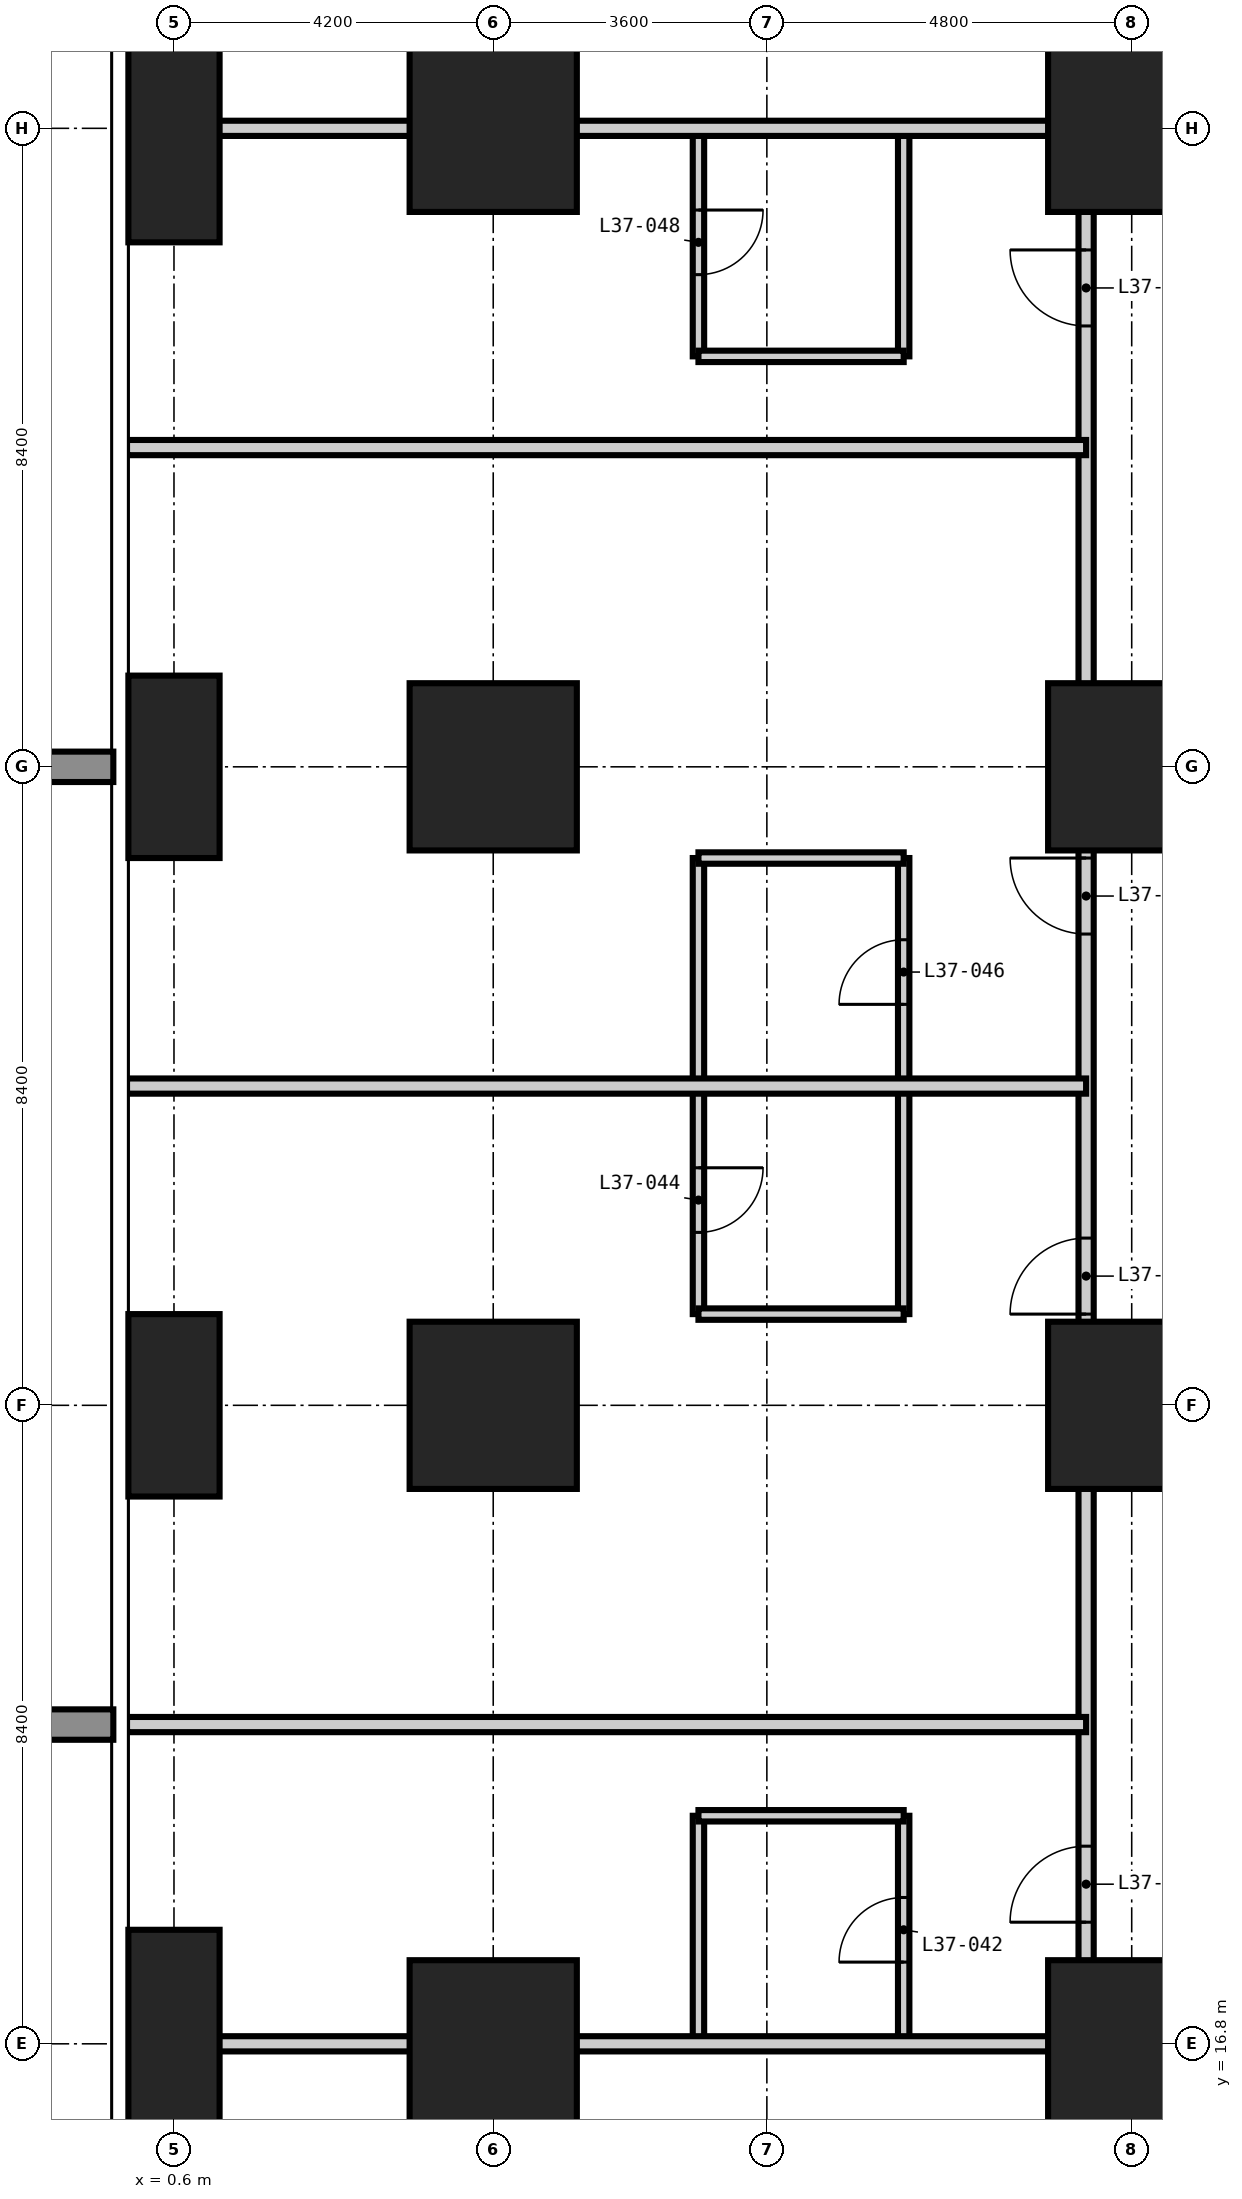
"""IFC4 building model, lengths in metres.
Left out: names, types, materials, properties, quantities, classifications, styles, units other than length and angle.
Written with IfcOpenShell. Run it as: python <this file> out.ifc"""

import sys

from ifc_helpers import new_model, si_unit, direction, frame, frame_2d, origin, origin_2d, place, context, subcontext, project, spatial, rectangle, extrude, element, fill, save


model = new_model("IFC4")
c1 = context("Model", 3, precision=1e-05, world=origin(), true_north=direction((0.0, 1.0)))
c2 = subcontext(c1, "Body", "Model", "MODEL_VIEW")
j1 = project(units=[si_unit("LENGTHUNIT", "METRE"), si_unit("PLANEANGLEUNIT", "RADIAN")], contexts=[c1])
p1 = place(None, origin())
s1 = spatial("IfcSite", under=j1, at=p1, CompositionType="ELEMENT")
p2 = place(p1, origin())
s2 = spatial("IfcBuilding", under=s1, at=p2, CompositionType="ELEMENT")
p3 = place(p2, frame((0.0, 0.0, 144.0)))
s3 = spatial("IfcBuildingStorey", under=s2, at=p3, CompositionType="ELEMENT", Elevation=144.0)
p4 = place(p3, frame((0.6, 16.8, -0.35), z_axis=(0.0, 0.0, 1.0), x_axis=(1.0, 0.0, 0.0)))
e1 = element("IfcColumn", 1, at=p4, inside=s3, PredefinedType="COLUMN", context=c2, shape_type="SweptSolid", body=[
    extrude(rectangle(XDim=1.2, YDim=3.0, at=origin_2d()), origin(), (0.0, 0.0, 1.0), 3.6),
])
for number, where, z_axis, x_axis in (
    (2, (0.6, 25.2, -0.35), (0.0, 0.0, 1.0), (1.0, 0.0, 0.0)),
    (3, (0.6, 33.6, -0.35), (0.0, 0.0, 1.0), (1.0, 0.0, 0.0)),
):
    element("IfcColumn", number, at=place(p3, frame(where, z_axis=z_axis, x_axis=x_axis)), inside=s3, PredefinedType="COLUMN", context=c2, shape_type="SweptSolid", body=[
        extrude(rectangle(XDim=1.2, YDim=2.4, at=origin_2d()), origin(), (0.0, 0.0, 1.0), 3.6),
    ])
p5 = place(p3, frame((0.6, 42.0, -0.35), z_axis=(0.0, 0.0, 1.0), x_axis=(1.0, 0.0, 0.0)))
e4 = element("IfcColumn", 4, at=p5, inside=s3, PredefinedType="COLUMN", context=c2, shape_type="SweptSolid", body=[
    extrude(rectangle(XDim=1.2, YDim=3.0, at=origin_2d()), origin(), (0.0, 0.0, 1.0), 3.6),
])
for number, where, z_axis, x_axis in (
    (5, (4.8, 16.8, -0.35), (0.0, 0.0, 1.0), (1.0, 0.0, 0.0)),
    (6, (4.8, 25.2, -0.35), (0.0, 0.0, 1.0), (1.0, 0.0, 0.0)),
    (7, (4.8, 33.6, -0.35), (0.0, 0.0, 1.0), (1.0, 0.0, 0.0)),
    (8, (4.8, 42.0, -0.35), (0.0, 0.0, 1.0), (1.0, 0.0, 0.0)),
    (9, (13.2, 16.8, -0.35), (0.0, 0.0, 1.0), (1.0, 0.0, 0.0)),
    (10, (13.2, 25.2, -0.35), (0.0, 0.0, 1.0), (1.0, 0.0, 0.0)),
    (11, (13.2, 33.6, -0.35), (0.0, 0.0, 1.0), (1.0, 0.0, 0.0)),
    (12, (13.2, 42.0, -0.35), (0.0, 0.0, 1.0), (1.0, 0.0, 0.0)),
):
    element("IfcColumn", number, at=place(p3, frame(where, z_axis=z_axis, x_axis=x_axis)), inside=s3, PredefinedType="COLUMN", context=c2, shape_type="SweptSolid", body=[
        extrude(rectangle(XDim=2.2, YDim=2.2, at=origin_2d()), origin(), (0.0, 0.0, 1.0), 3.6),
    ])
p6 = place(p3, frame((7.5, 16.8, 0.0), z_axis=(0.0, 0.0, 1.0), x_axis=(0.0, 1.0, 0.0)))
e13 = element("IfcWall", 13, at=p6, inside=s3, PredefinedType="PARTITIONING", context=c2, shape_type="SweptSolid", body=[
    extrude(rectangle(XDim=3.0, YDim=0.15, at=frame_2d((1.5, 0.0))), origin(), (0.0, 0.0, 1.0), 3.25),
])
p7 = place(p3, frame((7.5, 26.4, 0.0), z_axis=(0.0, 0.0, 1.0), x_axis=(0.0, 1.0, 0.0)))
e14 = element("IfcWall", 14, at=p7, inside=s3, PredefinedType="PARTITIONING", context=c2, shape_type="SweptSolid", body=[
    extrude(rectangle(XDim=6.0, YDim=0.15, at=frame_2d((3.0, 0.0))), origin(), (0.0, 0.0, 1.0), 3.25),
])
p8 = place(p7, frame((1.075, 0.0, 0.0)))
e15 = element("IfcOpeningElement", 15, at=p8, cuts=e14, PredefinedType="OPENING", context=c2, shape_type="SweptSolid", body=[
    extrude(rectangle(XDim=0.85, YDim=2.1, at=frame_2d((0.425, 1.05))), frame((0.0, 0.085, 0.0), z_axis=(0.0, -1.0, 0.0), x_axis=(1.0, 0.0, 0.0)), (0.0, 0.0, 1.0), 0.17),
])
p9 = place(p3, frame((7.5, 39.0, 0.0), z_axis=(0.0, 0.0, 1.0), x_axis=(0.0, 1.0, 0.0)))
e16 = element("IfcWall", 16, at=p9, inside=s3, PredefinedType="PARTITIONING", context=c2, shape_type="SweptSolid", body=[
    extrude(rectangle(XDim=3.0, YDim=0.15, at=frame_2d((1.5, 0.0))), origin(), (0.0, 0.0, 1.0), 3.25),
])
p10 = place(p9, frame((1.075, 0.0, 0.0)))
e17 = element("IfcOpeningElement", 17, at=p10, cuts=e16, PredefinedType="OPENING", context=c2, shape_type="SweptSolid", body=[
    extrude(rectangle(XDim=0.85, YDim=2.1, at=frame_2d((0.425, 1.05))), frame((0.0, 0.085, 0.0), z_axis=(0.0, -1.0, 0.0), x_axis=(1.0, 0.0, 0.0)), (0.0, 0.0, 1.0), 0.17),
])
p11 = place(p3, frame((10.2, 16.8, 0.0), z_axis=(0.0, 0.0, 1.0), x_axis=(0.0, 1.0, 0.0)))
e18 = element("IfcWall", 18, at=p11, inside=s3, PredefinedType="PARTITIONING", context=c2, shape_type="SweptSolid", body=[
    extrude(rectangle(XDim=3.0, YDim=0.15, at=frame_2d((1.5, 0.0))), origin(), (0.0, 0.0, 1.0), 3.25),
])
p12 = place(p11, frame((1.075, 0.0, 0.0)))
e19 = element("IfcOpeningElement", 19, at=p12, cuts=e18, PredefinedType="OPENING", context=c2, shape_type="SweptSolid", body=[
    extrude(rectangle(XDim=0.85, YDim=2.1, at=frame_2d((0.425, 1.05))), frame((0.0, 0.085, 0.0), z_axis=(0.0, -1.0, 0.0), x_axis=(1.0, 0.0, 0.0)), (0.0, 0.0, 1.0), 0.17),
])
p13 = place(p3, frame((10.2, 26.4, 0.0), z_axis=(0.0, 0.0, 1.0), x_axis=(0.0, 1.0, 0.0)))
e20 = element("IfcWall", 20, at=p13, inside=s3, PredefinedType="PARTITIONING", context=c2, shape_type="SweptSolid", body=[
    extrude(rectangle(XDim=6.0, YDim=0.15, at=frame_2d((3.0, 0.0))), origin(), (0.0, 0.0, 1.0), 3.25),
])
p14 = place(p13, frame((4.075, 0.0, 0.0)))
e21 = element("IfcOpeningElement", 21, at=p14, cuts=e20, PredefinedType="OPENING", context=c2, shape_type="SweptSolid", body=[
    extrude(rectangle(XDim=0.85, YDim=2.1, at=frame_2d((0.425, 1.05))), frame((0.0, 0.085, 0.0), z_axis=(0.0, -1.0, 0.0), x_axis=(1.0, 0.0, 0.0)), (0.0, 0.0, 1.0), 0.17),
])
p15 = place(p3, frame((10.2, 39.0, 0.0), z_axis=(0.0, 0.0, 1.0), x_axis=(0.0, 1.0, 0.0)))
e22 = element("IfcWall", 22, at=p15, inside=s3, PredefinedType="PARTITIONING", context=c2, shape_type="SweptSolid", body=[
    extrude(rectangle(XDim=3.0, YDim=0.15, at=frame_2d((1.5, 0.0))), origin(), (0.0, 0.0, 1.0), 3.25),
])
for number, where, z_axis, x_axis in (
    (23, (7.5, 19.8, 0.0), (0.0, 0.0, 1.0), (1.0, 0.0, 0.0)),
    (24, (7.5, 26.4, 0.0), (0.0, 0.0, 1.0), (1.0, 0.0, 0.0)),
    (25, (7.5, 32.4, 0.0), (0.0, 0.0, 1.0), (1.0, 0.0, 0.0)),
    (26, (7.5, 39.0, 0.0), (0.0, 0.0, 1.0), (1.0, 0.0, 0.0)),
):
    element("IfcWall", number, at=place(p3, frame(where, z_axis=z_axis, x_axis=x_axis)), inside=s3, PredefinedType="PARTITIONING", context=c2, shape_type="SweptSolid", body=[
        extrude(rectangle(XDim=2.7, YDim=0.15, at=frame_2d((1.35, 0.0))), origin(), (0.0, 0.0, 1.0), 3.25),
    ])
p16 = place(p3, frame((12.6, 13.1, 0.0), z_axis=(0.0, 0.0, 1.0), x_axis=(0.0, 1.0, 0.0)))
e27 = element("IfcWall", 27, at=p16, inside=s3, PredefinedType="PARTITIONING", context=c2, shape_type="SweptSolid", body=[
    extrude(rectangle(XDim=31.4, YDim=0.2, at=frame_2d((15.7, 0.0))), origin(), (0.0, 0.0, 1.0), 3.25),
])
p17 = place(p16, frame((5.3, 0.0, 0.0)))
e28 = element("IfcOpeningElement", 28, at=p17, cuts=e27, PredefinedType="OPENING", context=c2, shape_type="SweptSolid", body=[
    extrude(rectangle(XDim=1.0, YDim=2.2, at=frame_2d((0.5, 1.1))), frame((0.0, 0.11, 0.0), z_axis=(0.0, -1.0, 0.0), x_axis=(1.0, 0.0, 0.0)), (0.0, 0.0, 1.0), 0.22),
])
p18 = place(p16, frame((13.3, 0.0, 0.0)))
e29 = element("IfcOpeningElement", 29, at=p18, cuts=e27, PredefinedType="OPENING", context=c2, shape_type="SweptSolid", body=[
    extrude(rectangle(XDim=1.0, YDim=2.2, at=frame_2d((0.5, 1.1))), frame((0.0, 0.11, 0.0), z_axis=(0.0, -1.0, 0.0), x_axis=(1.0, 0.0, 0.0)), (0.0, 0.0, 1.0), 0.22),
])
p19 = place(p16, frame((18.3, 0.0, 0.0)))
e30 = element("IfcOpeningElement", 30, at=p19, cuts=e27, PredefinedType="OPENING", context=c2, shape_type="SweptSolid", body=[
    extrude(rectangle(XDim=1.0, YDim=2.2, at=frame_2d((0.5, 1.1))), frame((0.0, 0.11, 0.0), z_axis=(0.0, -1.0, 0.0), x_axis=(1.0, 0.0, 0.0)), (0.0, 0.0, 1.0), 0.22),
])
p20 = place(p16, frame((26.3, 0.0, 0.0)))
e31 = element("IfcOpeningElement", 31, at=p20, cuts=e27, PredefinedType="OPENING", context=c2, shape_type="SweptSolid", body=[
    extrude(rectangle(XDim=1.0, YDim=2.2, at=frame_2d((0.5, 1.1))), frame((0.0, 0.11, 0.0), z_axis=(0.0, -1.0, 0.0), x_axis=(1.0, 0.0, 0.0)), (0.0, 0.0, 1.0), 0.22),
])
p21 = place(p16, frame((1.35, 0.0, 0.0)))
e32 = element("IfcOpeningElement", 32, at=p21, cuts=e27, PredefinedType="OPENING", context=c2, shape_type="SweptSolid", body=[
    extrude(rectangle(XDim=1.0, YDim=2.2, at=frame_2d((0.5, 1.1))), frame((0.0, 0.11, 0.0), z_axis=(0.0, -1.0, 0.0), x_axis=(1.0, 0.0, 0.0)), (0.0, 0.0, 1.0), 0.22),
])
p22 = place(p16, frame((30.05, 0.0, 0.0)))
e33 = element("IfcOpeningElement", 33, at=p22, cuts=e27, PredefinedType="OPENING", context=c2, shape_type="SweptSolid", body=[
    extrude(rectangle(XDim=1.0, YDim=2.2, at=frame_2d((0.5, 1.1))), frame((0.0, 0.11, 0.0), z_axis=(0.0, -1.0, 0.0), x_axis=(1.0, 0.0, 0.0)), (0.0, 0.0, 1.0), 0.22),
])
for number, where, z_axis, x_axis in (
    (34, (-0.018, 16.8, 0.0), (0.0, 0.0, 1.0), (1.0, 0.0, 0.0)),
    (35, (-0.018, 21.0, 0.0), (0.0, 0.0, 1.0), (1.0, 0.0, 0.0)),
    (36, (-0.018, 29.4, 0.0), (0.0, 0.0, 1.0), (1.0, 0.0, 0.0)),
    (37, (-0.018, 37.8, 0.0), (0.0, 0.0, 1.0), (1.0, 0.0, 0.0)),
    (38, (-0.018, 42.0, 0.0), (0.0, 0.0, 1.0), (1.0, 0.0, 0.0)),
):
    element("IfcWall", number, at=place(p3, frame(where, z_axis=z_axis, x_axis=x_axis)), inside=s3, PredefinedType="PARTITIONING", context=c2, shape_type="SweptSolid", body=[
        extrude(rectangle(XDim=12.618, YDim=0.2, at=frame_2d((6.309, 0.0))), origin(), (0.0, 0.0, 1.0), 3.25),
    ])
p23 = place(p17, origin())
e39 = element("IfcDoor", 39, at=p23, inside=s3, OperationType="SINGLE_SWING_LEFT", PredefinedType="DOOR", context=c2, shape_type="SweptSolid", body=[
    extrude(rectangle(XDim=1.0, YDim=2.2, at=frame_2d((0.5, 1.1))), frame((0.0, 0.025, 0.0), z_axis=(0.0, -1.0, 0.0), x_axis=(1.0, 0.0, 0.0)), (0.0, 0.0, 1.0), 0.05),
])
fill(e28, e39)
p24 = place(p12, origin())
e40 = element("IfcDoor", 40, at=p24, inside=s3, OperationType="SINGLE_SWING_LEFT", PredefinedType="DOOR", context=c2, shape_type="SweptSolid", body=[
    extrude(rectangle(XDim=0.85, YDim=2.1, at=frame_2d((0.425, 1.05))), frame((0.0, 0.025, 0.0), z_axis=(0.0, -1.0, 0.0), x_axis=(1.0, 0.0, 0.0)), (0.0, 0.0, 1.0), 0.05),
])
fill(e19, e40)
p25 = place(p18, origin())
e41 = element("IfcDoor", 41, at=p25, inside=s3, OperationType="SINGLE_SWING_LEFT", PredefinedType="DOOR", context=c2, shape_type="SweptSolid", body=[
    extrude(rectangle(XDim=1.0, YDim=2.2, at=frame_2d((0.5, 1.1))), frame((0.0, 0.025, 0.0), z_axis=(0.0, -1.0, 0.0), x_axis=(1.0, 0.0, 0.0)), (0.0, 0.0, 1.0), 0.05),
])
fill(e29, e41)
p26 = place(p8, frame((0.85, 0.0, 0.0), z_axis=(0.0, 0.0, 1.0), x_axis=(-1.0, 0.0, 0.0)))
e42 = element("IfcDoor", 42, at=p26, inside=s3, OperationType="SINGLE_SWING_LEFT", PredefinedType="DOOR", context=c2, shape_type="SweptSolid", body=[
    extrude(rectangle(XDim=0.85, YDim=2.1, at=frame_2d((0.425, 1.05))), frame((0.0, 0.025, 0.0), z_axis=(0.0, -1.0, 0.0), x_axis=(1.0, 0.0, 0.0)), (0.0, 0.0, 1.0), 0.05),
])
fill(e15, e42)
p27 = place(p19, origin())
e43 = element("IfcDoor", 43, at=p27, inside=s3, OperationType="SINGLE_SWING_RIGHT", PredefinedType="DOOR", context=c2, shape_type="SweptSolid", body=[
    extrude(rectangle(XDim=1.0, YDim=2.2, at=frame_2d((0.5, 1.1))), frame((0.0, 0.025, 0.0), z_axis=(0.0, -1.0, 0.0), x_axis=(1.0, 0.0, 0.0)), (0.0, 0.0, 1.0), 0.05),
])
fill(e30, e43)
p28 = place(p14, origin())
e44 = element("IfcDoor", 44, at=p28, inside=s3, OperationType="SINGLE_SWING_LEFT", PredefinedType="DOOR", context=c2, shape_type="SweptSolid", body=[
    extrude(rectangle(XDim=0.85, YDim=2.1, at=frame_2d((0.425, 1.05))), frame((0.0, 0.025, 0.0), z_axis=(0.0, -1.0, 0.0), x_axis=(1.0, 0.0, 0.0)), (0.0, 0.0, 1.0), 0.05),
])
fill(e21, e44)
p29 = place(p20, origin())
e45 = element("IfcDoor", 45, at=p29, inside=s3, OperationType="SINGLE_SWING_RIGHT", PredefinedType="DOOR", context=c2, shape_type="SweptSolid", body=[
    extrude(rectangle(XDim=1.0, YDim=2.2, at=frame_2d((0.5, 1.1))), frame((0.0, 0.025, 0.0), z_axis=(0.0, -1.0, 0.0), x_axis=(1.0, 0.0, 0.0)), (0.0, 0.0, 1.0), 0.05),
])
fill(e31, e45)
p30 = place(p10, frame((0.85, 0.0, 0.0), z_axis=(0.0, 0.0, 1.0), x_axis=(-1.0, 0.0, 0.0)))
e46 = element("IfcDoor", 46, at=p30, inside=s3, OperationType="SINGLE_SWING_LEFT", PredefinedType="DOOR", context=c2, shape_type="SweptSolid", body=[
    extrude(rectangle(XDim=0.85, YDim=2.1, at=frame_2d((0.425, 1.05))), frame((0.0, 0.025, 0.0), z_axis=(0.0, -1.0, 0.0), x_axis=(1.0, 0.0, 0.0)), (0.0, 0.0, 1.0), 0.05),
])
fill(e17, e46)
save(model, sys.argv[1])
